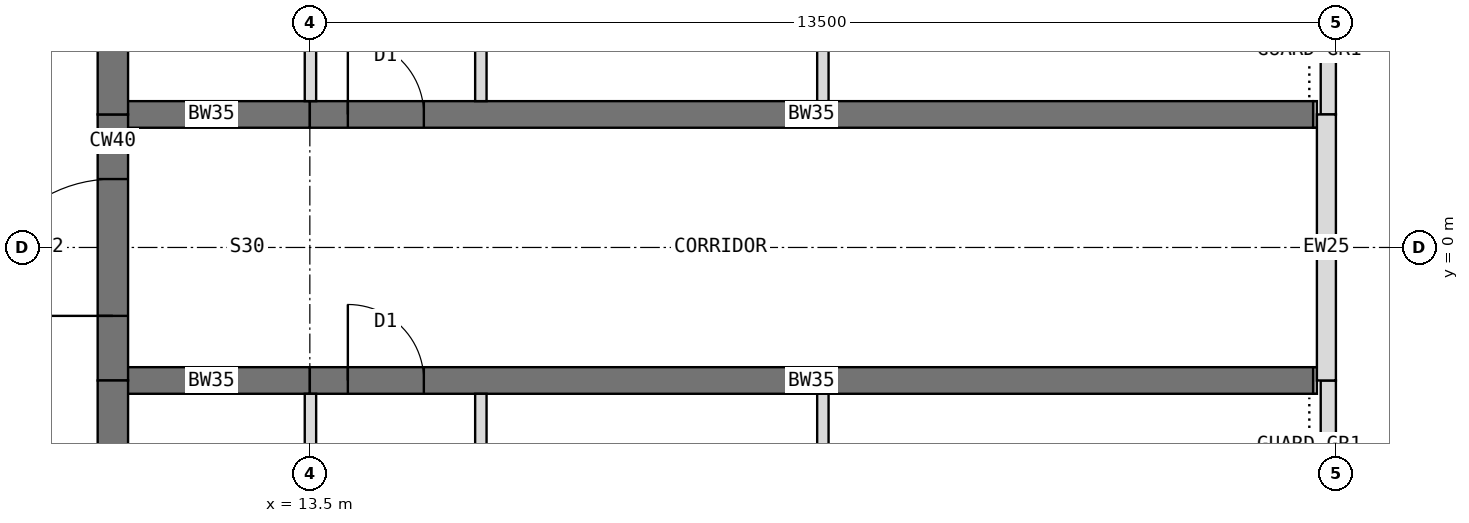
"""IFC4 building model, lengths in metres.
Left out: names, types, materials, properties, quantities, classifications, styles, units other than length and angle.
Written with IfcOpenShell. Run it as: python <this file> out.ifc"""

import sys

from ifc_helpers import new_model, si_unit, direction, frame, frame_2d, origin, place, context, subcontext, project, spatial, rectangle, extrude, element, fill, save


model = new_model("IFC4")
c1 = context("Model", 3, precision=1e-05, world=origin(), true_north=direction((0.0, 1.0)))
c2 = subcontext(c1, "Body", "Model", "MODEL_VIEW")
j1 = project(units=[si_unit("LENGTHUNIT", "METRE"), si_unit("PLANEANGLEUNIT", "RADIAN")], contexts=[c1])
p1 = place(None, origin())
s1 = spatial("IfcSite", under=j1, at=p1, CompositionType="ELEMENT")
p2 = place(p1, origin())
s2 = spatial("IfcBuilding", under=s1, at=p2, CompositionType="ELEMENT")
p3 = place(p2, frame((0.0, 0.0, 291.5)))
s3 = spatial("IfcBuildingStorey", under=s2, at=p3, CompositionType="ELEMENT", Elevation=291.5)
p4 = place(p3, frame((10.908, -6.298, 0.0), z_axis=(0.0, 0.0, 1.0), x_axis=(0.0, 1.0, 0.0)))
e1 = element("IfcWall", 1, at=p4, inside=s3, PredefinedType="SHEAR", context=c2, shape_type="SweptSolid", body=[
    extrude(rectangle(XDim=4.548, YDim=0.4, at=frame_2d((2.274, 0.0))), origin(), (0.0, 0.0, 1.0), 4.55),
])
p5 = place(p3, frame((10.908, -1.75, 0.0), z_axis=(0.0, 0.0, 1.0), x_axis=(0.0, 1.0, 0.0)))
e2 = element("IfcWall", 2, at=p5, inside=s3, PredefinedType="SHEAR", context=c2, shape_type="SweptSolid", body=[
    extrude(rectangle(XDim=3.5, YDim=0.4, at=frame_2d((1.75, 0.0))), origin(), (0.0, 0.0, 1.0), 4.55),
])
p6 = place(p5, frame((0.85, 0.0, 0.0)))
e3 = element("IfcOpeningElement", 3, at=p6, cuts=e2, PredefinedType="OPENING", context=c2, shape_type="SweptSolid", body=[
    extrude(rectangle(XDim=1.8, YDim=2.1, at=frame_2d((0.9, 1.05))), frame((0.0, 0.21, 0.0), z_axis=(0.0, -1.0, 0.0), x_axis=(1.0, 0.0, 0.0)), (0.0, 0.0, 1.0), 0.42),
])
p7 = place(p3, frame((10.908, 1.75, 0.0), z_axis=(0.0, 0.0, 1.0), x_axis=(0.0, 1.0, 0.0)))
e4 = element("IfcWall", 4, at=p7, inside=s3, PredefinedType="SHEAR", context=c2, shape_type="SweptSolid", body=[
    extrude(rectangle(XDim=4.548, YDim=0.4, at=frame_2d((2.274, 0.0))), origin(), (0.0, 0.0, 1.0), 4.55),
])
p8 = place(p3, frame((10.908, 1.75, 0.0), z_axis=(0.0, 0.0, 1.0), x_axis=(1.0, 0.0, 0.0)))
e5 = element("IfcWall", 5, at=p8, inside=s3, PredefinedType="SHEAR", context=c2, shape_type="SweptSolid", body=[
    extrude(rectangle(XDim=2.592, YDim=0.35, at=frame_2d((1.296, 0.0))), origin(), (0.0, 0.0, 1.0), 4.55),
])
p9 = place(p3, frame((13.5, 1.75, 0.0), z_axis=(0.0, 0.0, 1.0), x_axis=(1.0, 0.0, 0.0)))
e6 = element("IfcWall", 6, at=p9, inside=s3, PredefinedType="SHEAR", context=c2, shape_type="SweptSolid", body=[
    extrude(rectangle(XDim=13.2, YDim=0.35, at=frame_2d((6.6, 0.0))), origin(), (0.0, 0.0, 1.0), 4.55),
])
p10 = place(p9, frame((0.5, 0.0, 0.0)))
e7 = element("IfcOpeningElement", 7, at=p10, cuts=e6, PredefinedType="OPENING", context=c2, shape_type="SweptSolid", body=[
    extrude(rectangle(XDim=1.0, YDim=2.1, at=frame_2d((0.5, 1.05))), frame((0.0, 0.185, 0.0), z_axis=(0.0, -1.0, 0.0), x_axis=(1.0, 0.0, 0.0)), (0.0, 0.0, 1.0), 0.37),
])
p11 = place(p3, frame((10.908, -1.75, 0.0), z_axis=(0.0, 0.0, 1.0), x_axis=(1.0, 0.0, 0.0)))
e8 = element("IfcWall", 8, at=p11, inside=s3, PredefinedType="SHEAR", context=c2, shape_type="SweptSolid", body=[
    extrude(rectangle(XDim=2.592, YDim=0.35, at=frame_2d((1.296, 0.0))), origin(), (0.0, 0.0, 1.0), 4.55),
])
p12 = place(p3, frame((13.5, -1.75, 0.0), z_axis=(0.0, 0.0, 1.0), x_axis=(1.0, 0.0, 0.0)))
e9 = element("IfcWall", 9, at=p12, inside=s3, PredefinedType="SHEAR", context=c2, shape_type="SweptSolid", body=[
    extrude(rectangle(XDim=13.2, YDim=0.35, at=frame_2d((6.6, 0.0))), origin(), (0.0, 0.0, 1.0), 4.55),
])
p13 = place(p12, frame((0.5, 0.0, 0.0)))
e10 = element("IfcOpeningElement", 10, at=p13, cuts=e9, PredefinedType="OPENING", context=c2, shape_type="SweptSolid", body=[
    extrude(rectangle(XDim=1.0, YDim=2.1, at=frame_2d((0.5, 1.05))), frame((0.0, 0.185, 0.0), z_axis=(0.0, -1.0, 0.0), x_axis=(1.0, 0.0, 0.0)), (0.0, 0.0, 1.0), 0.37),
])
p14 = place(p3, frame((26.9, -4.5, 0.0), z_axis=(0.0, 0.0, 1.0), x_axis=(0.0, 1.0, 0.0)))
e11 = element("IfcWall", 11, at=p14, inside=s3, PredefinedType="USERDEFINED", context=c2, shape_type="SweptSolid", body=[
    extrude(rectangle(XDim=2.75, YDim=0.2, at=frame_2d((1.375, 0.0))), origin(), (0.0, 0.0, 1.0), 4.55),
])
p15 = place(p3, frame((26.875, -1.75, 0.0), z_axis=(0.0, 0.0, 1.0), x_axis=(0.0, 1.0, 0.0)))
e12 = element("IfcWall", 12, at=p15, inside=s3, PredefinedType="STANDARD", context=c2, shape_type="SweptSolid", body=[
    extrude(rectangle(XDim=3.5, YDim=0.25, at=frame_2d((1.75, 0.0))), origin(), (0.0, 0.0, 1.0), 4.55),
])
p16 = place(p3, frame((26.9, 1.75, 0.0), z_axis=(0.0, 0.0, 1.0), x_axis=(0.0, 1.0, 0.0)))
e13 = element("IfcWall", 13, at=p16, inside=s3, PredefinedType="USERDEFINED", context=c2, shape_type="SweptSolid", body=[
    extrude(rectangle(XDim=2.75, YDim=0.2, at=frame_2d((1.375, 0.0))), origin(), (0.0, 0.0, 1.0), 4.55),
])
for number, where, z_axis, x_axis in (
    (14, (26.7, 1.75, 0.0), (0.0, 0.0, 1.0), (1.0, 0.0, 0.0)),
    (15, (26.7, -1.75, 0.0), (0.0, 0.0, 1.0), (1.0, 0.0, 0.0)),
):
    element("IfcWall", number, at=place(p3, frame(where, z_axis=z_axis, x_axis=x_axis)), inside=s3, PredefinedType="PARTITIONING", context=c2, shape_type="SweptSolid", body=[
        extrude(rectangle(XDim=0.05, YDim=0.35, at=frame_2d((0.025, 0.0))), origin(), (0.0, 0.0, 1.0), 4.55),
    ])
p17 = place(p3, frame((15.75, 1.925, 0.0), z_axis=(0.0, 0.0, 1.0), x_axis=(0.0, 1.0, 0.0)))
e16 = element("IfcWall", 16, at=p17, inside=s3, PredefinedType="PARTITIONING", context=c2, shape_type="SweptSolid", body=[
    extrude(rectangle(XDim=4.825, YDim=0.15, at=frame_2d((2.413, 0.0))), origin(), (0.0, 0.0, 1.0), 4.55),
])
p18 = place(p17, frame((3.425, 0.0, 0.0)))
e17 = element("IfcOpeningElement", 17, at=p18, cuts=e16, PredefinedType="OPENING", context=c2, shape_type="SweptSolid", body=[
    extrude(rectangle(XDim=1.0, YDim=2.1, at=frame_2d((0.5, 1.05))), frame((0.0, 0.085, 0.0), z_axis=(0.0, -1.0, 0.0), x_axis=(1.0, 0.0, 0.0)), (0.0, 0.0, 1.0), 0.17),
])
p19 = place(p3, frame((20.25, 1.925, 0.0), z_axis=(0.0, 0.0, 1.0), x_axis=(0.0, 1.0, 0.0)))
e18 = element("IfcWall", 18, at=p19, inside=s3, PredefinedType="PARTITIONING", context=c2, shape_type="SweptSolid", body=[
    extrude(rectangle(XDim=4.825, YDim=0.15, at=frame_2d((2.413, 0.0))), origin(), (0.0, 0.0, 1.0), 4.55),
])
p20 = place(p19, frame((3.425, 0.0, 0.0)))
e19 = element("IfcOpeningElement", 19, at=p20, cuts=e18, PredefinedType="OPENING", context=c2, shape_type="SweptSolid", body=[
    extrude(rectangle(XDim=1.0, YDim=2.1, at=frame_2d((0.5, 1.05))), frame((0.0, 0.085, 0.0), z_axis=(0.0, -1.0, 0.0), x_axis=(1.0, 0.0, 0.0)), (0.0, 0.0, 1.0), 0.17),
])
p21 = place(p3, frame((13.508, 1.925, 0.0), z_axis=(0.0, 0.0, 1.0), x_axis=(0.0, 1.0, 0.0)))
e20 = element("IfcWall", 20, at=p21, inside=s3, PredefinedType="PARTITIONING", context=c2, shape_type="SweptSolid", body=[
    extrude(rectangle(XDim=2.4, YDim=0.15, at=frame_2d((1.2, 0.0))), origin(), (0.0, 0.0, 1.0), 4.017),
])
p22 = place(p3, frame((15.75, -1.925, 0.0), z_axis=(0.0, 0.0, 1.0), x_axis=(0.0, -1.0, 0.0)))
e21 = element("IfcWall", 21, at=p22, inside=s3, PredefinedType="PARTITIONING", context=c2, shape_type="SweptSolid", body=[
    extrude(rectangle(XDim=4.825, YDim=0.15, at=frame_2d((2.413, 0.0))), origin(), (0.0, 0.0, 1.0), 4.55),
])
p23 = place(p22, frame((3.425, 0.0, 0.0)))
e22 = element("IfcOpeningElement", 22, at=p23, cuts=e21, PredefinedType="OPENING", context=c2, shape_type="SweptSolid", body=[
    extrude(rectangle(XDim=1.0, YDim=2.1, at=frame_2d((0.5, 1.05))), frame((0.0, 0.085, 0.0), z_axis=(0.0, -1.0, 0.0), x_axis=(1.0, 0.0, 0.0)), (0.0, 0.0, 1.0), 0.17),
])
p24 = place(p3, frame((20.25, -1.925, 0.0), z_axis=(0.0, 0.0, 1.0), x_axis=(0.0, -1.0, 0.0)))
e23 = element("IfcWall", 23, at=p24, inside=s3, PredefinedType="PARTITIONING", context=c2, shape_type="SweptSolid", body=[
    extrude(rectangle(XDim=4.825, YDim=0.15, at=frame_2d((2.413, 0.0))), origin(), (0.0, 0.0, 1.0), 4.55),
])
p25 = place(p24, frame((3.425, 0.0, 0.0)))
e24 = element("IfcOpeningElement", 24, at=p25, cuts=e23, PredefinedType="OPENING", context=c2, shape_type="SweptSolid", body=[
    extrude(rectangle(XDim=1.0, YDim=2.1, at=frame_2d((0.5, 1.05))), frame((0.0, 0.085, 0.0), z_axis=(0.0, -1.0, 0.0), x_axis=(1.0, 0.0, 0.0)), (0.0, 0.0, 1.0), 0.17),
])
p26 = place(p3, frame((13.508, -1.925, 0.0), z_axis=(0.0, 0.0, 1.0), x_axis=(0.0, -1.0, 0.0)))
e25 = element("IfcWall", 25, at=p26, inside=s3, PredefinedType="PARTITIONING", context=c2, shape_type="SweptSolid", body=[
    extrude(rectangle(XDim=2.4, YDim=0.15, at=frame_2d((1.2, 0.0))), origin(), (0.0, 0.0, 1.0), 4.017),
])
p27 = place(p6, origin())
e26 = element("IfcDoor", 26, at=p27, inside=s3, OperationType="DOUBLE_DOOR_DOUBLE_SWING", PredefinedType="DOOR", context=c2, shape_type="SweptSolid", body=[
    extrude(rectangle(XDim=1.8, YDim=2.1, at=frame_2d((0.9, 1.05))), frame((0.0, 0.025, 0.0), z_axis=(0.0, -1.0, 0.0), x_axis=(1.0, 0.0, 0.0)), (0.0, 0.0, 1.0), 0.05),
])
fill(e3, e26)
p28 = place(p10, origin())
e27 = element("IfcDoor", 27, at=p28, inside=s3, OperationType="SINGLE_SWING_LEFT", PredefinedType="DOOR", context=c2, shape_type="SweptSolid", body=[
    extrude(rectangle(XDim=1.0, YDim=2.1, at=frame_2d((0.5, 1.05))), frame((0.0, 0.025, 0.0), z_axis=(0.0, -1.0, 0.0), x_axis=(1.0, 0.0, 0.0)), (0.0, 0.0, 1.0), 0.05),
])
fill(e7, e27)
p29 = place(p13, origin())
e28 = element("IfcDoor", 28, at=p29, inside=s3, OperationType="SINGLE_SWING_LEFT", PredefinedType="DOOR", context=c2, shape_type="SweptSolid", body=[
    extrude(rectangle(XDim=1.0, YDim=2.1, at=frame_2d((0.5, 1.05))), frame((0.0, 0.025, 0.0), z_axis=(0.0, -1.0, 0.0), x_axis=(1.0, 0.0, 0.0)), (0.0, 0.0, 1.0), 0.05),
])
fill(e10, e28)
save(model, sys.argv[1])
